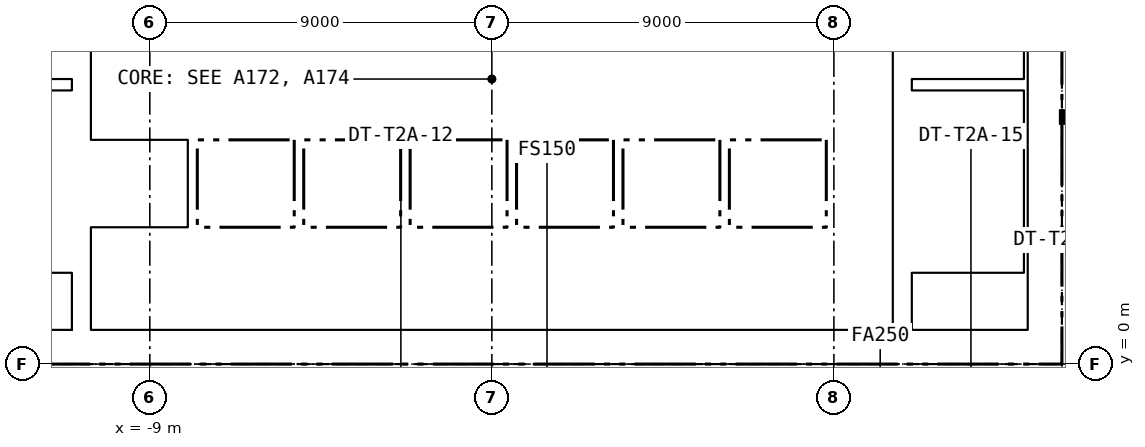
"""IFC4 building model, lengths in metres.
Left out: names, types, materials, properties, quantities, classifications, styles, units other than length and angle.
Written with IfcOpenShell. Run it as: python <this file> out.ifc"""

import sys

from ifc_helpers import new_model, si_unit, direction, frame, frame_2d, origin, place, context, subcontext, project, spatial, rectangle, extrude, element, fill, save


model = new_model("IFC4")
c1 = context("Model", 3, precision=1e-05, world=origin(), true_north=direction((0.0, 1.0)))
c2 = subcontext(c1, "Body", "Model", "MODEL_VIEW")
j1 = project(units=[si_unit("LENGTHUNIT", "METRE"), si_unit("PLANEANGLEUNIT", "RADIAN")], contexts=[c1])
p1 = place(None, origin())
s1 = spatial("IfcSite", under=j1, at=p1, CompositionType="ELEMENT")
p2 = place(p1, origin())
s2 = spatial("IfcBuilding", under=s1, at=p2, CompositionType="ELEMENT")
p3 = place(p2, frame((0.0, 0.0, 80.65)))
s3 = spatial("IfcBuildingStorey", under=s2, at=p3, CompositionType="ELEMENT", Elevation=80.65)
p4 = place(p3, frame((-15.0, 0.45, -0.15), z_axis=(0.0, 0.0, 1.0), x_axis=(1.0, 0.0, 0.0)))
e1 = element("IfcWall", 1, at=p4, inside=s3, PredefinedType="SOLIDWALL", context=c2, shape_type="SweptSolid", body=[
    extrude(rectangle(XDim=30.0, YDim=0.9, at=frame_2d((15.0, 0.0))), origin(), (0.0, 0.0, 1.0), 3.65),
])
p5 = place(p4, frame((5.8, 0.0, 0.15)))
e2 = element("IfcOpeningElement", 2, at=p5, cuts=e1, PredefinedType="OPENING", context=c2, shape_type="SweptSolid", body=[
    extrude(rectangle(XDim=2.4, YDim=2.4, at=frame_2d((1.2, 1.2))), frame((0.0, 0.46, 0.0), z_axis=(0.0, -1.0, 0.0), x_axis=(1.0, 0.0, 0.0)), (0.0, 0.0, 1.0), 0.92),
])
p6 = place(p4, frame((13.8, 0.0, 0.15)))
e3 = element("IfcOpeningElement", 3, at=p6, cuts=e1, PredefinedType="OPENING", context=c2, shape_type="SweptSolid", body=[
    extrude(rectangle(XDim=2.4, YDim=2.4, at=frame_2d((1.2, 1.2))), frame((0.0, 0.46, 0.0), z_axis=(0.0, -1.0, 0.0), x_axis=(1.0, 0.0, 0.0)), (0.0, 0.0, 1.0), 0.92),
])
p7 = place(p4, frame((21.8, 0.0, 0.15)))
e4 = element("IfcOpeningElement", 4, at=p7, cuts=e1, PredefinedType="OPENING", context=c2, shape_type="SweptSolid", body=[
    extrude(rectangle(XDim=2.4, YDim=2.4, at=frame_2d((1.2, 1.2))), frame((0.0, 0.46, 0.0), z_axis=(0.0, -1.0, 0.0), x_axis=(1.0, 0.0, 0.0)), (0.0, 0.0, 1.0), 0.92),
])
p8 = place(p4, frame((1.5, 0.0, 0.15)))
e5 = element("IfcOpeningElement", 5, at=p8, cuts=e1, PredefinedType="OPENING", context=c2, shape_type="SweptSolid", body=[
    extrude(rectangle(XDim=1.2, YDim=2.1, at=frame_2d((0.6, 1.05))), frame((0.0, 0.46, 0.0), z_axis=(0.0, -1.0, 0.0), x_axis=(1.0, 0.0, 0.0)), (0.0, 0.0, 1.0), 0.92),
])
p9 = place(p4, frame((27.3, 0.0, 0.15)))
e6 = element("IfcOpeningElement", 6, at=p9, cuts=e1, PredefinedType="OPENING", context=c2, shape_type="SweptSolid", body=[
    extrude(rectangle(XDim=1.2, YDim=2.1, at=frame_2d((0.6, 1.05))), frame((0.0, 0.46, 0.0), z_axis=(0.0, -1.0, 0.0), x_axis=(1.0, 0.0, 0.0)), (0.0, 0.0, 1.0), 0.92),
])
p10 = place(p3, frame((14.55, 0.9, -0.15), z_axis=(0.0, 0.0, 1.0), x_axis=(0.0, 1.0, 0.0)))
e7 = element("IfcWall", 7, at=p10, inside=s3, PredefinedType="SOLIDWALL", context=c2, shape_type="SweptSolid", body=[
    extrude(rectangle(XDim=13.2, YDim=0.9, at=frame_2d((6.6, 0.0))), origin(), (0.0, 0.0, 1.0), 3.65),
])
for number, where, z_axis, x_axis in (
    (8, (-10.8, 0.9, -0.15), (0.0, 0.0, 1.0), (0.0, 1.0, 0.0)),
    (9, (10.8, 0.9, -0.15), (0.0, 0.0, 1.0), (0.0, 1.0, 0.0)),
):
    element("IfcWall", number, at=place(p3, frame(where, z_axis=z_axis, x_axis=x_axis)), inside=s3, PredefinedType="SOLIDWALL", context=c2, shape_type="SweptSolid", body=[
        extrude(rectangle(XDim=13.2, YDim=0.5, at=frame_2d((6.6, 0.0))), origin(), (0.0, 0.0, 1.0), 3.65),
    ])
p11 = place(p3, frame((-10.55, 3.5, 0.0), z_axis=(0.0, 0.0, 1.0), x_axis=(1.0, 0.0, 0.0)))
e10 = element("IfcWall", 10, at=p11, inside=s3, PredefinedType="PARTITIONING", context=c2, shape_type="SweptSolid", body=[
    extrude(rectangle(XDim=21.1, YDim=0.2, at=frame_2d((10.55, 0.0))), origin(), (0.0, 0.0, 1.0), 3.5),
])
p12 = place(p11, frame((0.675, 0.0, 0.0)))
e11 = element("IfcOpeningElement", 11, at=p12, cuts=e10, PredefinedType="OPENING", context=c2, shape_type="SweptSolid", body=[
    extrude(rectangle(XDim=1.2, YDim=2.1, at=frame_2d((0.6, 1.05))), frame((0.0, 0.11, 0.0), z_axis=(0.0, -1.0, 0.0), x_axis=(1.0, 0.0, 0.0)), (0.0, 0.0, 1.0), 0.22),
])
p13 = place(p11, frame((3.475, 0.0, 0.0)))
e12 = element("IfcOpeningElement", 12, at=p13, cuts=e10, PredefinedType="OPENING", context=c2, shape_type="SweptSolid", body=[
    extrude(rectangle(XDim=1.2, YDim=2.1, at=frame_2d((0.6, 1.05))), frame((0.0, 0.11, 0.0), z_axis=(0.0, -1.0, 0.0), x_axis=(1.0, 0.0, 0.0)), (0.0, 0.0, 1.0), 0.22),
])
p14 = place(p11, frame((6.275, 0.0, 0.0)))
e13 = element("IfcOpeningElement", 13, at=p14, cuts=e10, PredefinedType="OPENING", context=c2, shape_type="SweptSolid", body=[
    extrude(rectangle(XDim=1.2, YDim=2.1, at=frame_2d((0.6, 1.05))), frame((0.0, 0.11, 0.0), z_axis=(0.0, -1.0, 0.0), x_axis=(1.0, 0.0, 0.0)), (0.0, 0.0, 1.0), 0.22),
])
p15 = place(p11, frame((9.075, 0.0, 0.0)))
e14 = element("IfcOpeningElement", 14, at=p15, cuts=e10, PredefinedType="OPENING", context=c2, shape_type="SweptSolid", body=[
    extrude(rectangle(XDim=1.2, YDim=2.1, at=frame_2d((0.6, 1.05))), frame((0.0, 0.11, 0.0), z_axis=(0.0, -1.0, 0.0), x_axis=(1.0, 0.0, 0.0)), (0.0, 0.0, 1.0), 0.22),
])
p16 = place(p11, frame((11.875, 0.0, 0.0)))
e15 = element("IfcOpeningElement", 15, at=p16, cuts=e10, PredefinedType="OPENING", context=c2, shape_type="SweptSolid", body=[
    extrude(rectangle(XDim=1.2, YDim=2.1, at=frame_2d((0.6, 1.05))), frame((0.0, 0.11, 0.0), z_axis=(0.0, -1.0, 0.0), x_axis=(1.0, 0.0, 0.0)), (0.0, 0.0, 1.0), 0.22),
])
p17 = place(p11, frame((14.675, 0.0, 0.0)))
e16 = element("IfcOpeningElement", 16, at=p17, cuts=e10, PredefinedType="OPENING", context=c2, shape_type="SweptSolid", body=[
    extrude(rectangle(XDim=1.2, YDim=2.1, at=frame_2d((0.6, 1.05))), frame((0.0, 0.11, 0.0), z_axis=(0.0, -1.0, 0.0), x_axis=(1.0, 0.0, 0.0)), (0.0, 0.0, 1.0), 0.22),
])
p18 = place(p11, frame((17.475, 0.0, 0.0)))
e17 = element("IfcOpeningElement", 17, at=p18, cuts=e10, PredefinedType="OPENING", context=c2, shape_type="SweptSolid", body=[
    extrude(rectangle(XDim=1.2, YDim=2.1, at=frame_2d((0.6, 1.05))), frame((0.0, 0.11, 0.0), z_axis=(0.0, -1.0, 0.0), x_axis=(1.0, 0.0, 0.0)), (0.0, 0.0, 1.0), 0.22),
])
p19 = place(p11, frame((19.9, 0.0, 0.0)))
e18 = element("IfcOpeningElement", 18, at=p19, cuts=e10, PredefinedType="OPENING", context=c2, shape_type="SweptSolid", body=[
    extrude(rectangle(XDim=0.9, YDim=2.1, at=frame_2d((0.45, 1.05))), frame((0.0, 0.11, 0.0), z_axis=(0.0, -1.0, 0.0), x_axis=(1.0, 0.0, 0.0)), (0.0, 0.0, 1.0), 0.22),
])
p20 = place(p3, frame((-10.55, 6.025, 0.0), z_axis=(0.0, 0.0, 1.0), x_axis=(1.0, 0.0, 0.0)))
e19 = element("IfcWall", 19, at=p20, inside=s3, PredefinedType="PARTITIONING", context=c2, shape_type="SweptSolid", body=[
    extrude(rectangle(XDim=21.1, YDim=0.25, at=frame_2d((10.55, 0.0))), origin(), (0.0, 0.0, 1.0), 3.5),
])
p21 = place(p3, frame((-4.125, 6.15, 0.0), z_axis=(0.0, 0.0, 1.0), x_axis=(0.0, 1.0, 0.0)))
e20 = element("IfcWall", 20, at=p21, inside=s3, PredefinedType="PARTITIONING", context=c2, shape_type="SweptSolid", body=[
    extrude(rectangle(XDim=4.95, YDim=0.25, at=frame_2d((2.475, 0.0))), origin(), (0.0, 0.0, 1.0), 3.5),
])
p22 = place(p21, frame((3.125, 0.0, 0.0)))
e21 = element("IfcOpeningElement", 21, at=p22, cuts=e20, PredefinedType="OPENING", context=c2, shape_type="SweptSolid", body=[
    extrude(rectangle(XDim=1.2, YDim=2.1, at=frame_2d((0.6, 1.05))), frame((0.0, 0.135, 0.0), z_axis=(0.0, -1.0, 0.0), x_axis=(1.0, 0.0, 0.0)), (0.0, 0.0, 1.0), 0.27),
])
for number, where, z_axis, x_axis in (
    (22, (-7.875, 3.6, 0.0), (0.0, 0.0, 1.0), (0.0, 1.0, 0.0)),
    (23, (-5.075, 3.6, 0.0), (0.0, 0.0, 1.0), (0.0, 1.0, 0.0)),
    (24, (-2.275, 3.6, 0.0), (0.0, 0.0, 1.0), (0.0, 1.0, 0.0)),
    (25, (0.525, 3.6, 0.0), (0.0, 0.0, 1.0), (0.0, 1.0, 0.0)),
    (26, (3.325, 3.6, 0.0), (0.0, 0.0, 1.0), (0.0, 1.0, 0.0)),
    (27, (6.125, 3.6, 0.0), (0.0, 0.0, 1.0), (0.0, 1.0, 0.0)),
    (28, (8.925, 3.6, 0.0), (0.0, 0.0, 1.0), (0.0, 1.0, 0.0)),
):
    element("IfcWall", number, at=place(p3, frame(where, z_axis=z_axis, x_axis=x_axis)), inside=s3, PredefinedType="PARTITIONING", context=c2, shape_type="SweptSolid", body=[
        extrude(rectangle(XDim=2.3, YDim=0.25, at=frame_2d((1.15, 0.0))), origin(), (0.0, 0.0, 1.0), 3.5),
    ])
for number, where, z_axis, x_axis in (
    (29, (-0.35, 6.15, 0.0), (0.0, 0.0, 1.0), (0.0, 1.0, 0.0)),
    (30, (3.1, 6.15, 0.0), (0.0, 0.0, 1.0), (0.0, 1.0, 0.0)),
):
    element("IfcWall", number, at=place(p3, frame(where, z_axis=z_axis, x_axis=x_axis)), inside=s3, PredefinedType="PARTITIONING", context=c2, shape_type="SweptSolid", body=[
        extrude(rectangle(XDim=2.3, YDim=0.15, at=frame_2d((1.15, 0.0))), origin(), (0.0, 0.0, 1.0), 3.5),
    ])
p23 = place(p3, frame((8.925, 6.15, 0.0), z_axis=(0.0, 0.0, 1.0), x_axis=(0.0, 1.0, 0.0)))
e31 = element("IfcWall", 31, at=p23, inside=s3, PredefinedType="PARTITIONING", context=c2, shape_type="SweptSolid", body=[
    extrude(rectangle(XDim=2.3, YDim=0.25, at=frame_2d((1.15, 0.0))), origin(), (0.0, 0.0, 1.0), 3.5),
])
for number, where, z_axis, x_axis in (
    (32, (-14.0, 7.35, 0.0), (0.0, 0.0, 1.0), (1.0, 0.0, 0.0)),
    (33, (11.05, 7.35, 0.0), (0.0, 0.0, 1.0), (1.0, 0.0, 0.0)),
):
    element("IfcWall", number, at=place(p3, frame(where, z_axis=z_axis, x_axis=x_axis)), inside=s3, PredefinedType="SOLIDWALL", context=c2, shape_type="SweptSolid", body=[
        extrude(rectangle(XDim=2.95, YDim=0.3, at=frame_2d((1.475, 0.0))), origin(), (0.0, 0.0, 1.0), 3.5),
    ])
p24 = place(p3, frame((14.05, 0.9, 0.0), z_axis=(0.0, 0.0, 1.0), x_axis=(0.0, 1.0, 0.0)))
e34 = element("IfcWall", 34, at=p24, inside=s3, PredefinedType="SOLIDWALL", context=c2, shape_type="SweptSolid", body=[
    extrude(rectangle(XDim=13.2, YDim=0.1, at=frame_2d((6.6, 0.0))), origin(), (0.0, 0.0, 1.0), 3.5),
])
p25 = place(p3, frame((15.0, 6.5, 0.0), z_axis=(0.0, 0.0, 1.0), x_axis=(1.0, 0.0, 0.0)))
e35 = element("IfcWall", 35, at=p25, inside=s3, PredefinedType="PARTITIONING", context=c2, shape_type="SweptSolid", body=[
    extrude(rectangle(XDim=3.275, YDim=0.25, at=frame_2d((1.637, 0.0))), origin(), (0.0, 0.0, 1.0), 2.741),
])
p26 = place(p12, origin())
e36 = element("IfcDoor", 36, at=p26, inside=s3, OperationType="DOUBLE_DOOR_SLIDING", PredefinedType="DOOR", context=c2, shape_type="SweptSolid", body=[
    extrude(rectangle(XDim=1.2, YDim=2.1, at=frame_2d((0.6, 1.05))), frame((0.0, 0.025, 0.0), z_axis=(0.0, -1.0, 0.0), x_axis=(1.0, 0.0, 0.0)), (0.0, 0.0, 1.0), 0.05),
])
fill(e11, e36)
p27 = place(p13, origin())
e37 = element("IfcDoor", 37, at=p27, inside=s3, OperationType="DOUBLE_DOOR_SLIDING", PredefinedType="DOOR", context=c2, shape_type="SweptSolid", body=[
    extrude(rectangle(XDim=1.2, YDim=2.1, at=frame_2d((0.6, 1.05))), frame((0.0, 0.025, 0.0), z_axis=(0.0, -1.0, 0.0), x_axis=(1.0, 0.0, 0.0)), (0.0, 0.0, 1.0), 0.05),
])
fill(e12, e37)
p28 = place(p14, origin())
e38 = element("IfcDoor", 38, at=p28, inside=s3, OperationType="DOUBLE_DOOR_SLIDING", PredefinedType="DOOR", context=c2, shape_type="SweptSolid", body=[
    extrude(rectangle(XDim=1.2, YDim=2.1, at=frame_2d((0.6, 1.05))), frame((0.0, 0.025, 0.0), z_axis=(0.0, -1.0, 0.0), x_axis=(1.0, 0.0, 0.0)), (0.0, 0.0, 1.0), 0.05),
])
fill(e13, e38)
p29 = place(p15, origin())
e39 = element("IfcDoor", 39, at=p29, inside=s3, OperationType="DOUBLE_DOOR_SLIDING", PredefinedType="DOOR", context=c2, shape_type="SweptSolid", body=[
    extrude(rectangle(XDim=1.2, YDim=2.1, at=frame_2d((0.6, 1.05))), frame((0.0, 0.025, 0.0), z_axis=(0.0, -1.0, 0.0), x_axis=(1.0, 0.0, 0.0)), (0.0, 0.0, 1.0), 0.05),
])
fill(e14, e39)
p30 = place(p16, origin())
e40 = element("IfcDoor", 40, at=p30, inside=s3, OperationType="DOUBLE_DOOR_SLIDING", PredefinedType="DOOR", context=c2, shape_type="SweptSolid", body=[
    extrude(rectangle(XDim=1.2, YDim=2.1, at=frame_2d((0.6, 1.05))), frame((0.0, 0.025, 0.0), z_axis=(0.0, -1.0, 0.0), x_axis=(1.0, 0.0, 0.0)), (0.0, 0.0, 1.0), 0.05),
])
fill(e15, e40)
p31 = place(p17, origin())
e41 = element("IfcDoor", 41, at=p31, inside=s3, OperationType="DOUBLE_DOOR_SLIDING", PredefinedType="DOOR", context=c2, shape_type="SweptSolid", body=[
    extrude(rectangle(XDim=1.2, YDim=2.1, at=frame_2d((0.6, 1.05))), frame((0.0, 0.025, 0.0), z_axis=(0.0, -1.0, 0.0), x_axis=(1.0, 0.0, 0.0)), (0.0, 0.0, 1.0), 0.05),
])
fill(e16, e41)
p32 = place(p18, origin())
e42 = element("IfcDoor", 42, at=p32, inside=s3, OperationType="DOUBLE_DOOR_SLIDING", PredefinedType="DOOR", context=c2, shape_type="SweptSolid", body=[
    extrude(rectangle(XDim=1.2, YDim=2.1, at=frame_2d((0.6, 1.05))), frame((0.0, 0.025, 0.0), z_axis=(0.0, -1.0, 0.0), x_axis=(1.0, 0.0, 0.0)), (0.0, 0.0, 1.0), 0.05),
])
fill(e17, e42)
p33 = place(p19, origin())
e43 = element("IfcDoor", 43, at=p33, inside=s3, OperationType="SINGLE_SWING_RIGHT", PredefinedType="DOOR", context=c2, shape_type="SweptSolid", body=[
    extrude(rectangle(XDim=0.9, YDim=2.1, at=frame_2d((0.45, 1.05))), frame((0.0, 0.025, 0.0), z_axis=(0.0, -1.0, 0.0), x_axis=(1.0, 0.0, 0.0)), (0.0, 0.0, 1.0), 0.05),
])
fill(e18, e43)
p34 = place(p5, origin())
e44 = element("IfcDoor", 44, at=p34, inside=s3, OperationType="DOUBLE_DOOR_DOUBLE_SWING", PredefinedType="DOOR", context=c2, shape_type="SweptSolid", body=[
    extrude(rectangle(XDim=2.4, YDim=2.4, at=frame_2d((1.2, 1.2))), frame((0.0, 0.025, 0.0), z_axis=(0.0, -1.0, 0.0), x_axis=(1.0, 0.0, 0.0)), (0.0, 0.0, 1.0), 0.05),
])
fill(e2, e44)
p35 = place(p6, origin())
e45 = element("IfcDoor", 45, at=p35, inside=s3, OperationType="DOUBLE_DOOR_DOUBLE_SWING", PredefinedType="DOOR", context=c2, shape_type="SweptSolid", body=[
    extrude(rectangle(XDim=2.4, YDim=2.4, at=frame_2d((1.2, 1.2))), frame((0.0, 0.025, 0.0), z_axis=(0.0, -1.0, 0.0), x_axis=(1.0, 0.0, 0.0)), (0.0, 0.0, 1.0), 0.05),
])
fill(e3, e45)
p36 = place(p7, origin())
e46 = element("IfcDoor", 46, at=p36, inside=s3, OperationType="DOUBLE_DOOR_DOUBLE_SWING", PredefinedType="DOOR", context=c2, shape_type="SweptSolid", body=[
    extrude(rectangle(XDim=2.4, YDim=2.4, at=frame_2d((1.2, 1.2))), frame((0.0, 0.025, 0.0), z_axis=(0.0, -1.0, 0.0), x_axis=(1.0, 0.0, 0.0)), (0.0, 0.0, 1.0), 0.05),
])
fill(e4, e46)
p37 = place(p9, origin())
e47 = element("IfcDoor", 47, at=p37, inside=s3, OperationType="SINGLE_SWING_RIGHT", PredefinedType="DOOR", context=c2, shape_type="SweptSolid", body=[
    extrude(rectangle(XDim=1.2, YDim=2.1, at=frame_2d((0.6, 1.05))), frame((0.0, 0.025, 0.0), z_axis=(0.0, -1.0, 0.0), x_axis=(1.0, 0.0, 0.0)), (0.0, 0.0, 1.0), 0.05),
])
fill(e6, e47)
save(model, sys.argv[1])
